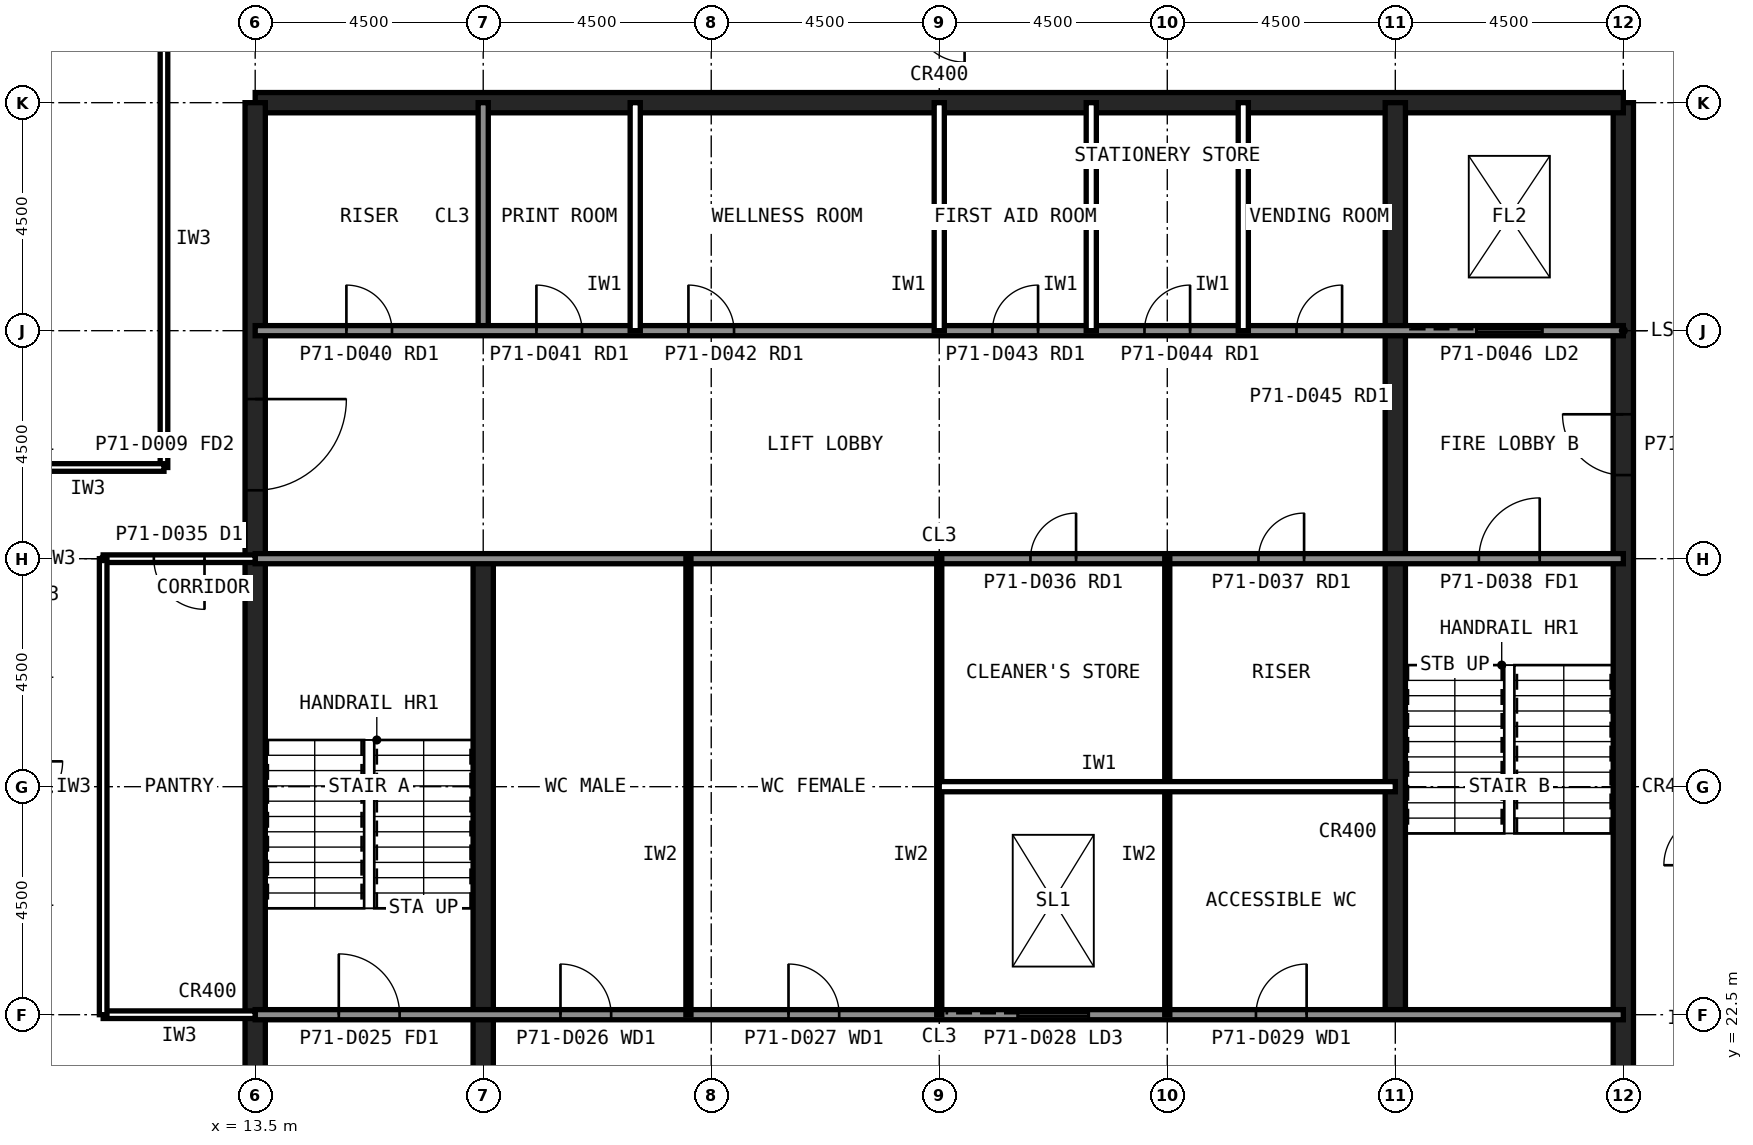
"""IFC4 building model, lengths in metres.
Left out: names, types, materials, properties, quantities, classifications, styles, units other than length and angle.
Written with IfcOpenShell. Run it as: python <this file> out.ifc"""

import sys

from ifc_helpers import new_model, si_unit, direction, frame, frame_2d, origin, place, context, subcontext, project, spatial, rectangle, extrude, element, fill, save


model = new_model("IFC4")
c1 = context("Model", 3, precision=1e-05, world=origin(), true_north=direction((0.0, 1.0)))
c2 = subcontext(c1, "Body", "Model", "MODEL_VIEW")
j1 = project(units=[si_unit("LENGTHUNIT", "METRE"), si_unit("PLANEANGLEUNIT", "RADIAN")], contexts=[c1])
p1 = place(None, origin())
s1 = spatial("IfcSite", under=j1, at=p1, CompositionType="ELEMENT")
p2 = place(p1, origin())
s2 = spatial("IfcBuilding", under=s1, at=p2, CompositionType="ELEMENT")
p3 = place(p2, frame((0.0, 0.0, 294.6)))
s3 = spatial("IfcBuildingStorey", under=s2, at=p3, CompositionType="ELEMENT", Elevation=294.6)
p4 = place(p3, frame((40.5, 13.5, 0.0), z_axis=(0.0, 0.0, 1.0), x_axis=(0.0, 1.0, 0.0)))
e1 = element("IfcWall", 1, at=p4, inside=s3, PredefinedType="SHEAR", context=c2, shape_type="SweptSolid", body=[
    extrude(rectangle(XDim=27.0, YDim=0.4, at=frame_2d((13.5, 0.0))), origin(), (0.0, 0.0, 1.0), 4.0),
])
p5 = place(p4, frame((5.85, 0.0, 0.0)))
e2 = element("IfcOpeningElement", 2, at=p5, cuts=e1, PredefinedType="OPENING", context=c2, shape_type="SweptSolid", body=[
    extrude(rectangle(XDim=1.8, YDim=2.1, at=frame_2d((0.9, 1.05))), frame((0.0, 0.21, 0.0), z_axis=(0.0, -1.0, 0.0), x_axis=(1.0, 0.0, 0.0)), (0.0, 0.0, 1.0), 0.42),
])
p6 = place(p4, frame((19.65, 0.0, 0.0)))
e3 = element("IfcOpeningElement", 3, at=p6, cuts=e1, PredefinedType="OPENING", context=c2, shape_type="SweptSolid", body=[
    extrude(rectangle(XDim=1.2, YDim=2.1, at=frame_2d((0.6, 1.05))), frame((0.0, 0.21, 0.0), z_axis=(0.0, -1.0, 0.0), x_axis=(1.0, 0.0, 0.0)), (0.0, 0.0, 1.0), 0.42),
])
p7 = place(p3, frame((40.5, 40.5, 0.0), z_axis=(0.0, 0.0, 1.0), x_axis=(-1.0, 0.0, 0.0)))
e4 = element("IfcWall", 4, at=p7, inside=s3, PredefinedType="SHEAR", context=c2, shape_type="SweptSolid", body=[
    extrude(rectangle(XDim=27.0, YDim=0.4, at=frame_2d((13.5, 0.0))), origin(), (0.0, 0.0, 1.0), 4.0),
])
p8 = place(p3, frame((13.5, 40.5, 0.0), z_axis=(0.0, 0.0, 1.0), x_axis=(0.0, -1.0, 0.0)))
e5 = element("IfcWall", 5, at=p8, inside=s3, PredefinedType="SHEAR", context=c2, shape_type="SweptSolid", body=[
    extrude(rectangle(XDim=27.0, YDim=0.4, at=frame_2d((13.5, 0.0))), origin(), (0.0, 0.0, 1.0), 4.0),
])
p9 = place(p8, frame((19.65, 0.0, 0.0)))
e6 = element("IfcOpeningElement", 6, at=p9, cuts=e5, PredefinedType="OPENING", context=c2, shape_type="SweptSolid", body=[
    extrude(rectangle(XDim=1.2, YDim=2.1, at=frame_2d((0.6, 1.05))), frame((0.0, 0.21, 0.0), z_axis=(0.0, -1.0, 0.0), x_axis=(1.0, 0.0, 0.0)), (0.0, 0.0, 1.0), 0.42),
])
p10 = place(p8, frame((5.85, 0.0, 0.0)))
e7 = element("IfcOpeningElement", 7, at=p10, cuts=e5, PredefinedType="OPENING", context=c2, shape_type="SweptSolid", body=[
    extrude(rectangle(XDim=1.8, YDim=2.1, at=frame_2d((0.9, 1.05))), frame((0.0, 0.21, 0.0), z_axis=(0.0, -1.0, 0.0), x_axis=(1.0, 0.0, 0.0)), (0.0, 0.0, 1.0), 0.42),
])
p11 = place(p3, frame((18.0, 13.5, 0.0), z_axis=(0.0, 0.0, 1.0), x_axis=(0.0, 1.0, 0.0)))
e8 = element("IfcWall", 8, at=p11, inside=s3, PredefinedType="SHEAR", context=c2, shape_type="SweptSolid", body=[
    extrude(rectangle(XDim=18.0, YDim=0.4, at=frame_2d((9.0, 0.0))), origin(), (0.0, 0.0, 1.0), 4.0),
])
p12 = place(p3, frame((18.0, 36.0, 0.0), z_axis=(0.0, 0.0, 1.0), x_axis=(0.0, 1.0, 0.0)))
e9 = element("IfcWall", 9, at=p12, inside=s3, PredefinedType="SOLIDWALL", context=c2, shape_type="SweptSolid", body=[
    extrude(rectangle(XDim=4.5, YDim=0.2, at=frame_2d((2.25, 0.0))), origin(), (0.0, 0.0, 1.0), 3.84),
])
p13 = place(p3, frame((36.0, 22.5, 0.0), z_axis=(0.0, 0.0, 1.0), x_axis=(0.0, 1.0, 0.0)))
e10 = element("IfcWall", 10, at=p13, inside=s3, PredefinedType="SHEAR", context=c2, shape_type="SweptSolid", body=[
    extrude(rectangle(XDim=18.0, YDim=0.4, at=frame_2d((9.0, 0.0))), origin(), (0.0, 0.0, 1.0), 4.0),
])
p14 = place(p3, frame((13.5, 36.0, 0.0), z_axis=(0.0, 0.0, 1.0), x_axis=(1.0, 0.0, 0.0)))
e11 = element("IfcWall", 11, at=p14, inside=s3, PredefinedType="SOLIDWALL", context=c2, shape_type="SweptSolid", body=[
    extrude(rectangle(XDim=27.0, YDim=0.2, at=frame_2d((13.5, 0.0))), origin(), (0.0, 0.0, 1.0), 3.84),
])
p15 = place(p14, frame((1.8, 0.0, 0.0)))
e12 = element("IfcOpeningElement", 12, at=p15, cuts=e11, PredefinedType="OPENING", context=c2, shape_type="SweptSolid", body=[
    extrude(rectangle(XDim=0.9, YDim=2.1, at=frame_2d((0.45, 1.05))), frame((0.0, 0.11, 0.0), z_axis=(0.0, -1.0, 0.0), x_axis=(1.0, 0.0, 0.0)), (0.0, 0.0, 1.0), 0.22),
])
p16 = place(p14, frame((5.55, 0.0, 0.0)))
e13 = element("IfcOpeningElement", 13, at=p16, cuts=e11, PredefinedType="OPENING", context=c2, shape_type="SweptSolid", body=[
    extrude(rectangle(XDim=0.9, YDim=2.1, at=frame_2d((0.45, 1.05))), frame((0.0, 0.11, 0.0), z_axis=(0.0, -1.0, 0.0), x_axis=(1.0, 0.0, 0.0)), (0.0, 0.0, 1.0), 0.22),
])
p17 = place(p14, frame((11.55, 0.0, 0.0)))
e14 = element("IfcOpeningElement", 14, at=p17, cuts=e11, PredefinedType="OPENING", context=c2, shape_type="SweptSolid", body=[
    extrude(rectangle(XDim=0.9, YDim=2.1, at=frame_2d((0.45, 1.05))), frame((0.0, 0.11, 0.0), z_axis=(0.0, -1.0, 0.0), x_axis=(1.0, 0.0, 0.0)), (0.0, 0.0, 1.0), 0.22),
])
p18 = place(p14, frame((14.55, 0.0, 0.0)))
e15 = element("IfcOpeningElement", 15, at=p18, cuts=e11, PredefinedType="OPENING", context=c2, shape_type="SweptSolid", body=[
    extrude(rectangle(XDim=0.9, YDim=2.1, at=frame_2d((0.45, 1.05))), frame((0.0, 0.11, 0.0), z_axis=(0.0, -1.0, 0.0), x_axis=(1.0, 0.0, 0.0)), (0.0, 0.0, 1.0), 0.22),
])
p19 = place(p14, frame((24.1, 0.0, 0.0)))
e16 = element("IfcOpeningElement", 16, at=p19, cuts=e11, PredefinedType="OPENING", context=c2, shape_type="SweptSolid", body=[
    extrude(rectangle(XDim=1.3, YDim=2.2, at=frame_2d((0.65, 1.1))), frame((0.0, 0.11, 0.0), z_axis=(0.0, -1.0, 0.0), x_axis=(1.0, 0.0, 0.0)), (0.0, 0.0, 1.0), 0.22),
])
p20 = place(p3, frame((13.5, 22.5, 0.0), z_axis=(0.0, 0.0, 1.0), x_axis=(1.0, 0.0, 0.0)))
e17 = element("IfcWall", 17, at=p20, inside=s3, PredefinedType="SOLIDWALL", context=c2, shape_type="SweptSolid", body=[
    extrude(rectangle(XDim=27.0, YDim=0.2, at=frame_2d((13.5, 0.0))), origin(), (0.0, 0.0, 1.0), 3.84),
])
p21 = place(p20, frame((1.65, 0.0, 0.0)))
e18 = element("IfcOpeningElement", 18, at=p21, cuts=e17, PredefinedType="OPENING", context=c2, shape_type="SweptSolid", body=[
    extrude(rectangle(XDim=1.2, YDim=2.1, at=frame_2d((0.6, 1.05))), frame((0.0, 0.11, 0.0), z_axis=(0.0, -1.0, 0.0), x_axis=(1.0, 0.0, 0.0)), (0.0, 0.0, 1.0), 0.22),
])
p22 = place(p20, frame((6.025, 0.0, 0.0)))
e19 = element("IfcOpeningElement", 19, at=p22, cuts=e17, PredefinedType="OPENING", context=c2, shape_type="SweptSolid", body=[
    extrude(rectangle(XDim=1.0, YDim=2.1, at=frame_2d((0.5, 1.05))), frame((0.0, 0.11, 0.0), z_axis=(0.0, -1.0, 0.0), x_axis=(1.0, 0.0, 0.0)), (0.0, 0.0, 1.0), 0.22),
])
p23 = place(p20, frame((10.525, 0.0, 0.0)))
e20 = element("IfcOpeningElement", 20, at=p23, cuts=e17, PredefinedType="OPENING", context=c2, shape_type="SweptSolid", body=[
    extrude(rectangle(XDim=1.0, YDim=2.1, at=frame_2d((0.5, 1.05))), frame((0.0, 0.11, 0.0), z_axis=(0.0, -1.0, 0.0), x_axis=(1.0, 0.0, 0.0)), (0.0, 0.0, 1.0), 0.22),
])
p24 = place(p20, frame((19.75, 0.0, 0.0)))
e21 = element("IfcOpeningElement", 21, at=p24, cuts=e17, PredefinedType="OPENING", context=c2, shape_type="SweptSolid", body=[
    extrude(rectangle(XDim=1.0, YDim=2.1, at=frame_2d((0.5, 1.05))), frame((0.0, 0.11, 0.0), z_axis=(0.0, -1.0, 0.0), x_axis=(1.0, 0.0, 0.0)), (0.0, 0.0, 1.0), 0.22),
])
p25 = place(p20, frame((15.05, 0.0, 0.0)))
e22 = element("IfcOpeningElement", 22, at=p25, cuts=e17, PredefinedType="OPENING", context=c2, shape_type="SweptSolid", body=[
    extrude(rectangle(XDim=1.4, YDim=2.4, at=frame_2d((0.7, 1.2))), frame((0.0, 0.11, 0.0), z_axis=(0.0, -1.0, 0.0), x_axis=(1.0, 0.0, 0.0)), (0.0, 0.0, 1.0), 0.22),
])
p26 = place(p3, frame((13.5, 31.5, 0.0), z_axis=(0.0, 0.0, 1.0), x_axis=(1.0, 0.0, 0.0)))
e23 = element("IfcWall", 23, at=p26, inside=s3, PredefinedType="SOLIDWALL", context=c2, shape_type="SweptSolid", body=[
    extrude(rectangle(XDim=27.0, YDim=0.2, at=frame_2d((13.5, 0.0))), origin(), (0.0, 0.0, 1.0), 3.84),
])
p27 = place(p26, frame((24.15, 0.0, 0.0)))
e24 = element("IfcOpeningElement", 24, at=p27, cuts=e23, PredefinedType="OPENING", context=c2, shape_type="SweptSolid", body=[
    extrude(rectangle(XDim=1.2, YDim=2.1, at=frame_2d((0.6, 1.05))), frame((0.0, 0.11, 0.0), z_axis=(0.0, -1.0, 0.0), x_axis=(1.0, 0.0, 0.0)), (0.0, 0.0, 1.0), 0.22),
])
p28 = place(p26, frame((15.3, 0.0, 0.0)))
e25 = element("IfcOpeningElement", 25, at=p28, cuts=e23, PredefinedType="OPENING", context=c2, shape_type="SweptSolid", body=[
    extrude(rectangle(XDim=0.9, YDim=2.1, at=frame_2d((0.45, 1.05))), frame((0.0, 0.11, 0.0), z_axis=(0.0, -1.0, 0.0), x_axis=(1.0, 0.0, 0.0)), (0.0, 0.0, 1.0), 0.22),
])
p29 = place(p26, frame((19.8, 0.0, 0.0)))
e26 = element("IfcOpeningElement", 26, at=p29, cuts=e23, PredefinedType="OPENING", context=c2, shape_type="SweptSolid", body=[
    extrude(rectangle(XDim=0.9, YDim=2.1, at=frame_2d((0.45, 1.05))), frame((0.0, 0.11, 0.0), z_axis=(0.0, -1.0, 0.0), x_axis=(1.0, 0.0, 0.0)), (0.0, 0.0, 1.0), 0.22),
])
for number, where, z_axis, x_axis in (
    (27, (24.0, 36.0, 0.0), (0.0, 0.0, 1.0), (0.0, 1.0, 0.0)),
    (28, (27.0, 36.0, 0.0), (0.0, 0.0, 1.0), (0.0, 1.0, 0.0)),
):
    element("IfcWall", number, at=place(p3, frame(where, z_axis=z_axis, x_axis=x_axis)), inside=s3, PredefinedType="PARTITIONING", context=c2, shape_type="SweptSolid", body=[
        extrude(rectangle(XDim=4.5, YDim=0.2, at=frame_2d((2.25, 0.0))), origin(), (0.0, 0.0, 1.0), 3.84),
    ])
for number, where, z_axis, x_axis in (
    (29, (22.05, 22.5, 0.0), (0.0, 0.0, 1.0), (0.0, 1.0, 0.0)),
    (30, (27.0, 22.5, 0.0), (0.0, 0.0, 1.0), (0.0, 1.0, 0.0)),
    (31, (31.5, 22.5, 0.0), (0.0, 0.0, 1.0), (0.0, 1.0, 0.0)),
):
    element("IfcWall", number, at=place(p3, frame(where, z_axis=z_axis, x_axis=x_axis)), inside=s3, PredefinedType="PLUMBINGWALL", context=c2, shape_type="SweptSolid", body=[
        extrude(rectangle(XDim=9.0, YDim=0.1, at=frame_2d((4.5, 0.0))), origin(), (0.0, 0.0, 1.0), 3.84),
    ])
p30 = place(p3, frame((27.0, 27.0, 0.0), z_axis=(0.0, 0.0, 1.0), x_axis=(1.0, 0.0, 0.0)))
e32 = element("IfcWall", 32, at=p30, inside=s3, PredefinedType="PARTITIONING", context=c2, shape_type="SweptSolid", body=[
    extrude(rectangle(XDim=9.0, YDim=0.2, at=frame_2d((4.5, 0.0))), origin(), (0.0, 0.0, 1.0), 3.84),
])
p31 = place(p3, frame((11.7, 42.3, 0.0), z_axis=(0.0, 0.0, 1.0), x_axis=(0.0, -1.0, 0.0)))
e33 = element("IfcWall", 33, at=p31, inside=s3, PredefinedType="PARTITIONING", context=c2, shape_type="SweptSolid", body=[
    extrude(rectangle(XDim=9.0, YDim=0.15, at=frame_2d((4.5, 0.0))), origin(), (0.0, 0.0, 1.0), 3.84),
])
p32 = place(p3, frame((11.7, 33.3, 0.0), z_axis=(0.0, 0.0, 1.0), x_axis=(-1.0, 0.0, 0.0)))
e34 = element("IfcWall", 34, at=p32, inside=s3, PredefinedType="PARTITIONING", context=c2, shape_type="SweptSolid", body=[
    extrude(rectangle(XDim=3.0, YDim=0.15, at=frame_2d((1.5, 0.0))), origin(), (0.0, 0.0, 1.0), 3.84),
])
p33 = place(p3, frame((10.5, 22.5, 0.0), z_axis=(0.0, 0.0, 1.0), x_axis=(1.0, 0.0, 0.0)))
e35 = element("IfcWall", 35, at=p33, inside=s3, PredefinedType="PARTITIONING", context=c2, shape_type="SweptSolid", body=[
    extrude(rectangle(XDim=3.0, YDim=0.15, at=frame_2d((1.5, 0.0))), origin(), (0.0, 0.0, 1.0), 2.989),
])
p34 = place(p3, frame((13.5, 31.5, 0.0), z_axis=(0.0, 0.0, 1.0), x_axis=(-1.0, 0.0, 0.0)))
e36 = element("IfcWall", 36, at=p34, inside=s3, PredefinedType="PARTITIONING", context=c2, shape_type="SweptSolid", body=[
    extrude(rectangle(XDim=3.0, YDim=0.15, at=frame_2d((1.5, 0.0))), origin(), (0.0, 0.0, 1.0), 2.989),
])
p35 = place(p34, frame((1.0, 0.0, 0.0)))
e37 = element("IfcOpeningElement", 37, at=p35, cuts=e36, PredefinedType="OPENING", context=c2, shape_type="SweptSolid", body=[
    extrude(rectangle(XDim=1.0, YDim=2.1, at=frame_2d((0.5, 1.05))), frame((0.0, 0.085, 0.0), z_axis=(0.0, -1.0, 0.0), x_axis=(1.0, 0.0, 0.0)), (0.0, 0.0, 1.0), 0.17),
])
p36 = place(p3, frame((10.5, 31.5, 0.0), z_axis=(0.0, 0.0, 1.0), x_axis=(0.0, -1.0, 0.0)))
e38 = element("IfcWall", 38, at=p36, inside=s3, PredefinedType="PARTITIONING", context=c2, shape_type="SweptSolid", body=[
    extrude(rectangle(XDim=9.0, YDim=0.15, at=frame_2d((4.5, 0.0))), origin(), (0.0, 0.0, 1.0), 3.84),
])
p37 = place(p10, origin())
e39 = element("IfcDoor", 39, at=p37, inside=s3, OperationType="SINGLE_SWING_LEFT", PredefinedType="DOOR", context=c2, shape_type="SweptSolid", body=[
    extrude(rectangle(XDim=1.8, YDim=2.1, at=frame_2d((0.9, 1.05))), frame((0.0, 0.025, 0.0), z_axis=(0.0, -1.0, 0.0), x_axis=(1.0, 0.0, 0.0)), (0.0, 0.0, 1.0), 0.05),
])
fill(e7, e39)
p38 = place(p6, origin())
e40 = element("IfcDoor", 40, at=p38, inside=s3, OperationType="SINGLE_SWING_RIGHT", PredefinedType="DOOR", context=c2, shape_type="SweptSolid", body=[
    extrude(rectangle(XDim=1.2, YDim=2.1, at=frame_2d((0.6, 1.05))), frame((0.0, 0.025, 0.0), z_axis=(0.0, -1.0, 0.0), x_axis=(1.0, 0.0, 0.0)), (0.0, 0.0, 1.0), 0.05),
])
fill(e3, e40)
p39 = place(p21, origin())
e41 = element("IfcDoor", 41, at=p39, inside=s3, OperationType="SINGLE_SWING_LEFT", PredefinedType="DOOR", context=c2, shape_type="SweptSolid", body=[
    extrude(rectangle(XDim=1.2, YDim=2.1, at=frame_2d((0.6, 1.05))), frame((0.0, 0.025, 0.0), z_axis=(0.0, -1.0, 0.0), x_axis=(1.0, 0.0, 0.0)), (0.0, 0.0, 1.0), 0.05),
])
fill(e18, e41)
p40 = place(p27, origin())
e42 = element("IfcDoor", 42, at=p40, inside=s3, OperationType="SINGLE_SWING_RIGHT", PredefinedType="DOOR", context=c2, shape_type="SweptSolid", body=[
    extrude(rectangle(XDim=1.2, YDim=2.1, at=frame_2d((0.6, 1.05))), frame((0.0, 0.025, 0.0), z_axis=(0.0, -1.0, 0.0), x_axis=(1.0, 0.0, 0.0)), (0.0, 0.0, 1.0), 0.05),
])
fill(e24, e42)
p41 = place(p22, origin())
e43 = element("IfcDoor", 43, at=p41, inside=s3, OperationType="SINGLE_SWING_LEFT", PredefinedType="DOOR", context=c2, shape_type="SweptSolid", body=[
    extrude(rectangle(XDim=1.0, YDim=2.1, at=frame_2d((0.5, 1.05))), frame((0.0, 0.025, 0.0), z_axis=(0.0, -1.0, 0.0), x_axis=(1.0, 0.0, 0.0)), (0.0, 0.0, 1.0), 0.05),
])
fill(e19, e43)
p42 = place(p23, origin())
e44 = element("IfcDoor", 44, at=p42, inside=s3, OperationType="SINGLE_SWING_LEFT", PredefinedType="DOOR", context=c2, shape_type="SweptSolid", body=[
    extrude(rectangle(XDim=1.0, YDim=2.1, at=frame_2d((0.5, 1.05))), frame((0.0, 0.025, 0.0), z_axis=(0.0, -1.0, 0.0), x_axis=(1.0, 0.0, 0.0)), (0.0, 0.0, 1.0), 0.05),
])
fill(e20, e44)
p43 = place(p24, origin())
e45 = element("IfcDoor", 45, at=p43, inside=s3, OperationType="SINGLE_SWING_RIGHT", PredefinedType="DOOR", context=c2, shape_type="SweptSolid", body=[
    extrude(rectangle(XDim=1.0, YDim=2.1, at=frame_2d((0.5, 1.05))), frame((0.0, 0.025, 0.0), z_axis=(0.0, -1.0, 0.0), x_axis=(1.0, 0.0, 0.0)), (0.0, 0.0, 1.0), 0.05),
])
fill(e21, e45)
p44 = place(p28, origin())
e46 = element("IfcDoor", 46, at=p44, inside=s3, OperationType="SINGLE_SWING_RIGHT", PredefinedType="DOOR", context=c2, shape_type="SweptSolid", body=[
    extrude(rectangle(XDim=0.9, YDim=2.1, at=frame_2d((0.45, 1.05))), frame((0.0, 0.025, 0.0), z_axis=(0.0, -1.0, 0.0), x_axis=(1.0, 0.0, 0.0)), (0.0, 0.0, 1.0), 0.05),
])
fill(e25, e46)
p45 = place(p29, origin())
e47 = element("IfcDoor", 47, at=p45, inside=s3, OperationType="SINGLE_SWING_RIGHT", PredefinedType="DOOR", context=c2, shape_type="SweptSolid", body=[
    extrude(rectangle(XDim=0.9, YDim=2.1, at=frame_2d((0.45, 1.05))), frame((0.0, 0.025, 0.0), z_axis=(0.0, -1.0, 0.0), x_axis=(1.0, 0.0, 0.0)), (0.0, 0.0, 1.0), 0.05),
])
fill(e26, e47)
p46 = place(p15, origin())
e48 = element("IfcDoor", 48, at=p46, inside=s3, OperationType="SINGLE_SWING_LEFT", PredefinedType="DOOR", context=c2, shape_type="SweptSolid", body=[
    extrude(rectangle(XDim=0.9, YDim=2.1, at=frame_2d((0.45, 1.05))), frame((0.0, 0.025, 0.0), z_axis=(0.0, -1.0, 0.0), x_axis=(1.0, 0.0, 0.0)), (0.0, 0.0, 1.0), 0.05),
])
fill(e12, e48)
p47 = place(p16, origin())
e49 = element("IfcDoor", 49, at=p47, inside=s3, OperationType="SINGLE_SWING_LEFT", PredefinedType="DOOR", context=c2, shape_type="SweptSolid", body=[
    extrude(rectangle(XDim=0.9, YDim=2.1, at=frame_2d((0.45, 1.05))), frame((0.0, 0.025, 0.0), z_axis=(0.0, -1.0, 0.0), x_axis=(1.0, 0.0, 0.0)), (0.0, 0.0, 1.0), 0.05),
])
fill(e13, e49)
p48 = place(p17, origin())
e50 = element("IfcDoor", 50, at=p48, inside=s3, OperationType="SINGLE_SWING_LEFT", PredefinedType="DOOR", context=c2, shape_type="SweptSolid", body=[
    extrude(rectangle(XDim=0.9, YDim=2.1, at=frame_2d((0.45, 1.05))), frame((0.0, 0.025, 0.0), z_axis=(0.0, -1.0, 0.0), x_axis=(1.0, 0.0, 0.0)), (0.0, 0.0, 1.0), 0.05),
])
fill(e14, e50)
p49 = place(p18, origin())
e51 = element("IfcDoor", 51, at=p49, inside=s3, OperationType="SINGLE_SWING_RIGHT", PredefinedType="DOOR", context=c2, shape_type="SweptSolid", body=[
    extrude(rectangle(XDim=0.9, YDim=2.1, at=frame_2d((0.45, 1.05))), frame((0.0, 0.025, 0.0), z_axis=(0.0, -1.0, 0.0), x_axis=(1.0, 0.0, 0.0)), (0.0, 0.0, 1.0), 0.05),
])
fill(e15, e51)
p50 = place(p19, origin())
e52 = element("IfcDoor", 52, at=p50, inside=s3, OperationType="SLIDING_TO_LEFT", PredefinedType="DOOR", context=c2, shape_type="SweptSolid", body=[
    extrude(rectangle(XDim=1.3, YDim=2.2, at=frame_2d((0.65, 1.1))), frame((0.0, 0.025, 0.0), z_axis=(0.0, -1.0, 0.0), x_axis=(1.0, 0.0, 0.0)), (0.0, 0.0, 1.0), 0.05),
])
fill(e16, e52)
p51 = place(p25, origin())
e53 = element("IfcDoor", 53, at=p51, inside=s3, OperationType="SLIDING_TO_LEFT", PredefinedType="DOOR", context=c2, shape_type="SweptSolid", body=[
    extrude(rectangle(XDim=1.4, YDim=2.4, at=frame_2d((0.7, 1.2))), frame((0.0, 0.025, 0.0), z_axis=(0.0, -1.0, 0.0), x_axis=(1.0, 0.0, 0.0)), (0.0, 0.0, 1.0), 0.05),
])
fill(e22, e53)
p52 = place(p35, origin())
e54 = element("IfcDoor", 54, at=p52, inside=s3, OperationType="SINGLE_SWING_LEFT", PredefinedType="DOOR", context=c2, shape_type="SweptSolid", body=[
    extrude(rectangle(XDim=1.0, YDim=2.1, at=frame_2d((0.5, 1.05))), frame((0.0, 0.025, 0.0), z_axis=(0.0, -1.0, 0.0), x_axis=(1.0, 0.0, 0.0)), (0.0, 0.0, 1.0), 0.05),
])
fill(e37, e54)
save(model, sys.argv[1])
